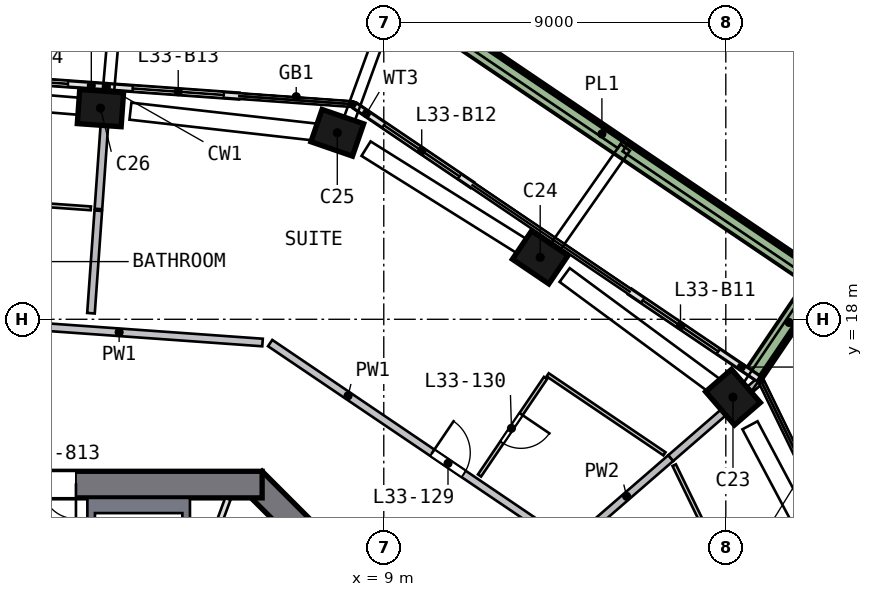
"""IFC4 building model, lengths in metres.
Left out: names, types, materials, properties, quantities, classifications, styles, units other than length and angle.
Written with IfcOpenShell. Run it as: python <this file> out.ifc"""

import sys

from ifc_helpers import new_model, si_unit, direction, frame, frame_2d, origin, origin_2d, place, context, subcontext, project, spatial, polyline, rectangle, outline, extrude, element, fill, save


model = new_model("IFC4")
c1 = context("Model", 3, precision=1e-05, world=origin(), true_north=direction((0.0, 1.0)))
c2 = subcontext(c1, "Body", "Model", "MODEL_VIEW")
j1 = project(units=[si_unit("LENGTHUNIT", "METRE"), si_unit("PLANEANGLEUNIT", "RADIAN")], contexts=[c1])
p1 = place(None, origin())
s1 = spatial("IfcSite", under=j1, at=p1, CompositionType="ELEMENT")
p2 = place(p1, origin())
s2 = spatial("IfcBuilding", under=s1, at=p2, CompositionType="ELEMENT")
p3 = place(p2, frame((0.0, 0.0, 140.0)))
s3 = spatial("IfcBuildingStorey", under=s2, at=p3, CompositionType="ELEMENT", Elevation=140.0)
p4 = place(p3, frame((18.281, 15.846, 0.0), z_axis=(-0.076026707, 0.086290312, 0.993364949), x_axis=(0.650337538, -0.750890104, 0.115000597)))
e1 = element("IfcColumn", 1, at=p4, inside=s3, PredefinedType="COLUMN", context=c2, shape_type="SweptSolid", body=[
    extrude(rectangle(XDim=1.15, YDim=0.9, at=origin_2d()), origin(), (0.0, 0.0, 1.0), 3.211),
])
p5 = place(p3, frame((13.229, 19.554, 0.0), z_axis=(-0.093541564, 0.062208942, 0.993669977), x_axis=(-0.822705306, 0.557258378, -0.112334676)))
e2 = element("IfcColumn", 2, at=p5, inside=s3, PredefinedType="COLUMN", context=c2, shape_type="SweptSolid", body=[
    extrude(rectangle(XDim=1.15, YDim=0.9, at=origin_2d()), origin(), (0.0, 0.0, 1.0), 3.21),
])
p6 = place(p3, frame((7.908, 22.864, 0.0), z_axis=(-0.10902185, 0.036720749, 0.993360872), x_axis=(0.938670117, -0.325061801, 0.115035803)))
e3 = element("IfcColumn", 3, at=p6, inside=s3, PredefinedType="COLUMN", context=c2, shape_type="SweptSolid", body=[
    extrude(rectangle(XDim=1.15, YDim=0.9, at=origin_2d()), origin(), (0.0, 0.0, 1.0), 3.211),
])
p7 = place(p3, frame((1.68, 23.549, 0.0), z_axis=(-0.112098063, 0.006996623, 0.993672517), x_axis=(-0.991182161, 0.070312823, -0.112312206)))
e4 = element("IfcColumn", 4, at=p7, inside=s3, PredefinedType="COLUMN", context=c2, shape_type="SweptSolid", body=[
    extrude(rectangle(XDim=1.15, YDim=0.9, at=origin_2d()), origin(), (0.0, 0.0, 1.0), 3.21),
])
p8 = place(p3, frame((13.752, 5.552, 0.0), z_axis=(0.0, 0.0, 1.0), x_axis=(-0.707106781, 0.707106781, 0.0)))
e5 = element("IfcWall", 5, at=p8, inside=s3, PredefinedType="SHEAR", context=c2, shape_type="SweptSolid", body=[
    extrude(rectangle(XDim=11.598, YDim=0.7, at=frame_2d((5.799, 0.0))), origin(), (0.0, 0.0, 1.0), 3.5),
])
p9 = place(p8, frame((2.099, 0.0, 0.0)))
e6 = element("IfcOpeningElement", 6, at=p9, cuts=e5, PredefinedType="OPENING", context=c2, shape_type="SweptSolid", body=[
    extrude(rectangle(XDim=1.2, YDim=2.1, at=frame_2d((0.6, 1.05))), frame((0.0, 0.36, 0.0), z_axis=(0.0, -1.0, 0.0), x_axis=(1.0, 0.0, 0.0)), (0.0, 0.0, 1.0), 0.72),
])
p10 = place(p3, frame((5.799, 13.65, 0.0), z_axis=(0.0, 0.0, 1.0), x_axis=(-1.0, 0.0, 0.0)))
e7 = element("IfcWall", 7, at=p10, inside=s3, PredefinedType="SHEAR", context=c2, shape_type="SweptSolid", body=[
    extrude(rectangle(XDim=11.598, YDim=0.7, at=frame_2d((5.799, 0.0))), origin(), (0.0, 0.0, 1.0), 3.5),
])
p11 = place(p10, frame((4.899, 0.0, 0.0)))
e8 = element("IfcOpeningElement", 8, at=p11, cuts=e7, PredefinedType="OPENING", context=c2, shape_type="SweptSolid", body=[
    extrude(rectangle(XDim=1.8, YDim=2.1, at=frame_2d((0.9, 1.05))), frame((0.0, 0.36, 0.0), z_axis=(0.0, -1.0, 0.0), x_axis=(1.0, 0.0, 0.0)), (0.0, 0.0, 1.0), 0.72),
])
p12 = place(p3, frame((18.852, 16.444, 0.0), z_axis=(0.0, 0.0, 1.0), x_axis=(-0.828263751, 0.560338433, 0.0)))
e9 = element("IfcWall", 9, at=p12, inside=s3, PredefinedType="SOLIDWALL", context=c2, shape_type="SweptSolid", body=[
    extrude(rectangle(XDim=4.068, YDim=0.15, at=frame_2d((2.034, 0.0))), origin(), (0.0, 0.0, 1.0), 2.475),
])
p13 = place(p12, frame((1.268, 0.0, 0.0)))
e10 = element("IfcOpeningElement", 10, at=p13, cuts=e9, PredefinedType="OPENING", context=c2, shape_type="SweptSolid", body=[
    extrude(rectangle(XDim=2.4, YDim=2.4, at=frame_2d((1.2, 1.2))), frame((0.0, 0.085, 0.0), z_axis=(0.0, -1.0, 0.0), x_axis=(1.0, 0.0, 0.0)), (0.0, 0.0, 1.0), 0.17),
])
p14 = place(p3, frame((11.323, 21.537, 0.0), z_axis=(0.0, 0.0, 1.0), x_axis=(-0.828244789, 0.56036646, 0.0)))
e11 = element("IfcWall", 11, at=p14, inside=s3, PredefinedType="SOLIDWALL", context=c2, shape_type="SweptSolid", body=[
    extrude(rectangle(XDim=3.71, YDim=0.15, at=frame_2d((1.855, 0.0))), origin(), (0.0, 0.0, 1.0), 2.475),
])
p15 = place(p14, frame((0.4, 0.0, 0.0)))
e12 = element("IfcOpeningElement", 12, at=p15, cuts=e11, PredefinedType="OPENING", context=c2, shape_type="SweptSolid", body=[
    extrude(rectangle(XDim=2.4, YDim=2.4, at=frame_2d((1.2, 1.2))), frame((0.0, 0.085, 0.0), z_axis=(0.0, -1.0, 0.0), x_axis=(1.0, 0.0, 0.0)), (0.0, 0.0, 1.0), 0.17),
])
p16 = place(p3, frame((5.187, 23.875, 0.0), z_axis=(0.0, 0.0, 1.0), x_axis=(-0.997464047, 0.071172155, 0.0)))
e13 = element("IfcWall", 13, at=p16, inside=s3, PredefinedType="SOLIDWALL", context=c2, shape_type="SweptSolid", body=[
    extrude(rectangle(XDim=3.475, YDim=0.15, at=frame_2d((1.737, 0.0))), origin(), (0.0, 0.0, 1.0), 2.475),
])
p17 = place(p16, frame((0.4, 0.0, 0.0)))
e14 = element("IfcOpeningElement", 14, at=p17, cuts=e13, PredefinedType="OPENING", context=c2, shape_type="SweptSolid", body=[
    extrude(rectangle(XDim=2.4, YDim=2.4, at=frame_2d((1.2, 1.2))), frame((0.0, 0.085, 0.0), z_axis=(0.0, -1.0, 0.0), x_axis=(1.0, 0.0, 0.0)), (0.0, 0.0, 1.0), 0.17),
])
p18 = place(p3, frame((1.721, 24.122, 0.0), z_axis=(0.0, 0.0, 1.0), x_axis=(-0.997464835, 0.071161106, 0.0)))
e15 = element("IfcWall", 15, at=p18, inside=s3, PredefinedType="SOLIDWALL", context=c2, shape_type="SweptSolid", body=[
    extrude(rectangle(XDim=3.836, YDim=0.15, at=frame_2d((1.918, 0.0))), origin(), (0.0, 0.0, 1.0), 2.475),
])
p19 = place(p18, frame((1.035, 0.0, 0.0)))
e16 = element("IfcOpeningElement", 16, at=p19, cuts=e15, PredefinedType="OPENING", context=c2, shape_type="SweptSolid", body=[
    extrude(rectangle(XDim=2.4, YDim=2.4, at=frame_2d((1.2, 1.2))), frame((0.0, 0.085, 0.0), z_axis=(0.0, -1.0, 0.0), x_axis=(1.0, 0.0, 0.0)), (0.0, 0.0, 1.0), 0.17),
])
p20 = place(p3, frame((18.77, 16.591, 0.0), z_axis=(0.0, 0.0, 1.0), x_axis=(0.560411001, 0.828214652, 0.0)))
e17 = element("IfcWall", 17, at=p20, inside=s3, PredefinedType="SOLIDWALL", context=c2, shape_type="SweptSolid", body=[
    extrude(rectangle(XDim=3.199, YDim=0.5, at=frame_2d((1.6, 0.0))), origin(), (0.0, 0.0, 1.0), 0.7),
])
p21 = place(p3, frame((20.216, 19.173, 0.0), z_axis=(0.0, 0.0, 1.0), x_axis=(-0.828258967, 0.560345504, 0.0)))
e18 = element("IfcWall", 18, at=p21, inside=s3, PredefinedType="SOLIDWALL", context=c2, shape_type="SweptSolid", body=[
    extrude(rectangle(XDim=13.223, YDim=0.5, at=frame_2d((6.612, 0.0))), origin(), (0.0, 0.0, 1.0), 0.7),
])
p22 = place(p3, origin())
e19 = element("IfcWall", 19, at=p22, inside=s3, PredefinedType="SOLIDWALL", context=c2, shape_type="SweptSolid", body=[
    extrude(outline(polyline([(3.9, 13.3), (3.9, 10.9), (3.7, 10.9), (3.7, 12.9), (1.4, 12.9), (1.4, 10.9), (1.2, 10.9), (1.2, 13.3), (3.9, 13.3)])), origin(), (0.0, 0.0, 1.0), 3.19),
])
p23 = place(p3, frame((1.776, 4.813, 0.0), z_axis=(0.0, 0.0, 1.0), x_axis=(0.346109381, 0.938194168, 0.0)))
e20 = element("IfcWall", 20, at=p23, inside=s3, PredefinedType="PARTITIONING", context=c2, shape_type="SweptSolid", body=[
    extrude(rectangle(XDim=9.016, YDim=0.15, at=frame_2d((4.508, 0.0))), origin(), (0.0, 0.0, 1.0), 3.19),
])
p24 = place(p23, frame((1.4, 0.0, 0.0)))
e21 = element("IfcOpeningElement", 21, at=p24, cuts=e20, PredefinedType="OPENING", context=c2, shape_type="SweptSolid", body=[
    extrude(rectangle(XDim=1.8, YDim=2.1, at=frame_2d((0.9, 1.05))), frame((0.0, 0.085, 0.0), z_axis=(0.0, -1.0, 0.0), x_axis=(1.0, 0.0, 0.0)), (0.0, 0.0, 1.0), 0.17),
])
p25 = place(p3, frame((-3.483, 18.052, 0.0), z_axis=(0.0, 0.0, 1.0), x_axis=(0.997463885, -0.071174419, 0.0)))
e22 = element("IfcWall", 22, at=p25, inside=s3, PredefinedType="SOLIDWALL", context=c2, shape_type="SweptSolid", body=[
    extrude(rectangle(XDim=9.316, YDim=0.2, at=frame_2d((4.658, 0.0))), origin(), (0.0, 0.0, 1.0), 3.19),
])
p26 = place(p25, frame((0.55, 0.0, 0.0)))
e23 = element("IfcOpeningElement", 23, at=p26, cuts=e22, PredefinedType="OPENING", context=c2, shape_type="SweptSolid", body=[
    extrude(rectangle(XDim=1.0, YDim=2.1, at=frame_2d((0.5, 1.05))), frame((0.0, 0.11, 0.0), z_axis=(0.0, -1.0, 0.0), x_axis=(1.0, 0.0, 0.0)), (0.0, 0.0, 1.0), 0.22),
])
p27 = place(p3, frame((6.01, 17.375, 0.0), z_axis=(0.0, 0.0, 1.0), x_axis=(0.828249794, -0.560359063, 0.0)))
e24 = element("IfcWall", 24, at=p27, inside=s3, PredefinedType="SOLIDWALL", context=c2, shape_type="SweptSolid", body=[
    extrude(rectangle(XDim=9.516, YDim=0.2, at=frame_2d((4.758, 0.0))), origin(), (0.0, 0.0, 1.0), 3.19),
])
p28 = place(p27, frame((5.15, 0.0, 0.0)))
e25 = element("IfcOpeningElement", 25, at=p28, cuts=e24, PredefinedType="OPENING", context=c2, shape_type="SweptSolid", body=[
    extrude(rectangle(XDim=1.0, YDim=2.1, at=frame_2d((0.5, 1.05))), frame((0.0, 0.11, 0.0), z_axis=(0.0, -1.0, 0.0), x_axis=(1.0, 0.0, 0.0)), (0.0, 0.0, 1.0), 0.22),
])
p29 = place(p3, frame((1.295, 18.159, 0.0), z_axis=(0.0, 0.0, 1.0), x_axis=(0.071125175, 0.997467398, 0.0)))
e26 = element("IfcWall", 26, at=p29, inside=s3, PredefinedType="SOLIDWALL", context=c2, shape_type="SweptSolid", body=[
    extrude(rectangle(XDim=2.705, YDim=0.2, at=frame_2d((1.353, 0.0))), origin(), (0.0, 0.0, 1.0), 3.19),
])
p30 = place(p3, frame((1.491, 20.903, 0.0), z_axis=(0.0, 0.0, 1.0), x_axis=(0.071186497, 0.997463023, 0.0)))
e27 = element("IfcWall", 27, at=p30, inside=s3, PredefinedType="SOLIDWALL", context=c2, shape_type="SweptSolid", body=[
    extrude(rectangle(XDim=3.152, YDim=0.2, at=frame_2d((1.576, 0.0))), origin(), (0.0, 0.0, 1.0), 3.19),
])
p31 = place(p3, frame((14.23, 12.335, 0.0), z_axis=(0.0, 0.0, 1.0), x_axis=(0.75561043, 0.655021281, 0.0)))
e28 = element("IfcWall", 28, at=p31, inside=s3, PredefinedType="SOLIDWALL", context=c2, shape_type="SweptSolid", body=[
    extrude(rectangle(XDim=3.073, YDim=0.2, at=frame_2d((1.536, 0.0))), origin(), (0.0, 0.0, 1.0), 3.19),
])
p32 = place(p3, frame((16.552, 14.348, 0.0), z_axis=(0.0, 0.0, 1.0), x_axis=(0.75562852, 0.655000411, 0.0)))
e29 = element("IfcWall", 29, at=p32, inside=s3, PredefinedType="SOLIDWALL", context=c2, shape_type="SweptSolid", body=[
    extrude(rectangle(XDim=3.059, YDim=0.2, at=frame_2d((1.53, 0.0))), origin(), (0.0, 0.0, 1.0), 3.19),
])
p33 = place(p3, frame((-1.102, 21.09, 0.0), z_axis=(0.0, 0.0, 1.0), x_axis=(0.997469016, -0.071102472, 0.0)))
e30 = element("IfcWall", 30, at=p33, inside=s3, PredefinedType="PARTITIONING", context=c2, shape_type="SweptSolid", body=[
    extrude(rectangle(XDim=2.4, YDim=0.1, at=frame_2d((1.2, 0.0))), origin(), (0.0, 0.0, 1.0), 3.19),
])
p34 = place(p3, frame((13.256, 16.456, 0.0), z_axis=(0.0, 0.0, 1.0), x_axis=(-0.560376113, -0.828238258, 0.0)))
e31 = element("IfcWall", 31, at=p34, inside=s3, PredefinedType="PARTITIONING", context=c2, shape_type="SweptSolid", body=[
    extrude(rectangle(XDim=3.1, YDim=0.1, at=frame_2d((1.55, 0.0))), origin(), (0.0, 0.0, 1.0), 3.19),
])
p35 = place(p34, frame((1.15, 0.0, 0.0)))
e32 = element("IfcOpeningElement", 32, at=p35, cuts=e31, PredefinedType="OPENING", context=c2, shape_type="SweptSolid", body=[
    extrude(rectangle(XDim=0.9, YDim=2.1, at=frame_2d((0.45, 1.05))), frame((0.0, 0.06, 0.0), z_axis=(0.0, -1.0, 0.0), x_axis=(1.0, 0.0, 0.0)), (0.0, 0.0, 1.0), 0.12),
])
p36 = place(p3, frame((13.312, 16.539, 0.0), z_axis=(0.0, 0.0, 1.0), x_axis=(0.828225037, -0.560395652, 0.0)))
e33 = element("IfcWall", 33, at=p36, inside=s3, PredefinedType="PARTITIONING", context=c2, shape_type="SweptSolid", body=[
    extrude(rectangle(XDim=3.711, YDim=0.1, at=frame_2d((1.855, 0.0))), origin(), (0.0, 0.0, 1.0), 3.19),
])
p37 = place(p3, frame((18.261, 10.83, 0.0), z_axis=(0.0, 0.0, 1.0), x_axis=(-0.437060899, 0.899431915, 0.0)))
e34 = element("IfcWall", 34, at=p37, inside=s3, PredefinedType="PARTITIONING", context=c2, shape_type="SweptSolid", body=[
    extrude(rectangle(XDim=3.704, YDim=0.1, at=frame_2d((1.852, 0.0))), origin(), (0.0, 0.0, 1.0), 3.19),
])
p38 = place(p13, origin())
e35 = element("IfcDoor", 35, at=p38, inside=s3, OperationType="SLIDING_TO_LEFT", PredefinedType="DOOR", context=c2, shape_type="SweptSolid", body=[
    extrude(rectangle(XDim=2.4, YDim=2.4, at=frame_2d((1.2, 1.2))), frame((0.0, 0.025, 0.0), z_axis=(0.0, -1.0, 0.0), x_axis=(1.0, 0.0, 0.0)), (0.0, 0.0, 1.0), 0.05),
])
fill(e10, e35)
p39 = place(p15, origin())
e36 = element("IfcDoor", 36, at=p39, inside=s3, OperationType="SLIDING_TO_RIGHT", PredefinedType="DOOR", context=c2, shape_type="SweptSolid", body=[
    extrude(rectangle(XDim=2.4, YDim=2.4, at=frame_2d((1.2, 1.2))), frame((0.0, 0.025, 0.0), z_axis=(0.0, -1.0, 0.0), x_axis=(1.0, 0.0, 0.0)), (0.0, 0.0, 1.0), 0.05),
])
fill(e12, e36)
p40 = place(p17, origin())
e37 = element("IfcDoor", 37, at=p40, inside=s3, OperationType="SLIDING_TO_RIGHT", PredefinedType="DOOR", context=c2, shape_type="SweptSolid", body=[
    extrude(rectangle(XDim=2.4, YDim=2.4, at=frame_2d((1.2, 1.2))), frame((0.0, 0.025, 0.0), z_axis=(0.0, -1.0, 0.0), x_axis=(1.0, 0.0, 0.0)), (0.0, 0.0, 1.0), 0.05),
])
fill(e14, e37)
p41 = place(p19, origin())
e38 = element("IfcDoor", 38, at=p41, inside=s3, OperationType="SLIDING_TO_LEFT", PredefinedType="DOOR", context=c2, shape_type="SweptSolid", body=[
    extrude(rectangle(XDim=2.4, YDim=2.4, at=frame_2d((1.2, 1.2))), frame((0.0, 0.025, 0.0), z_axis=(0.0, -1.0, 0.0), x_axis=(1.0, 0.0, 0.0)), (0.0, 0.0, 1.0), 0.05),
])
fill(e16, e38)
p42 = place(p11, origin())
e39 = element("IfcDoor", 39, at=p42, inside=s3, OperationType="DOUBLE_DOOR_SINGLE_SWING", PredefinedType="DOOR", context=c2, shape_type="SweptSolid", body=[
    extrude(rectangle(XDim=1.8, YDim=2.1, at=frame_2d((0.9, 1.05))), frame((0.0, 0.025, 0.0), z_axis=(0.0, -1.0, 0.0), x_axis=(1.0, 0.0, 0.0)), (0.0, 0.0, 1.0), 0.05),
])
fill(e8, e39)
p43 = place(p28, origin())
e40 = element("IfcDoor", 40, at=p43, inside=s3, OperationType="SINGLE_SWING_LEFT", PredefinedType="DOOR", context=c2, shape_type="SweptSolid", body=[
    extrude(rectangle(XDim=1.0, YDim=2.1, at=frame_2d((0.5, 1.05))), frame((0.0, 0.025, 0.0), z_axis=(0.0, -1.0, 0.0), x_axis=(1.0, 0.0, 0.0)), (0.0, 0.0, 1.0), 0.05),
])
fill(e25, e40)
p44 = place(p35, origin())
e41 = element("IfcDoor", 41, at=p44, inside=s3, OperationType="SINGLE_SWING_LEFT", PredefinedType="DOOR", context=c2, shape_type="SweptSolid", body=[
    extrude(rectangle(XDim=0.9, YDim=2.1, at=frame_2d((0.45, 1.05))), frame((0.0, 0.025, 0.0), z_axis=(0.0, -1.0, 0.0), x_axis=(1.0, 0.0, 0.0)), (0.0, 0.0, 1.0), 0.05),
])
fill(e32, e41)
save(model, sys.argv[1])
